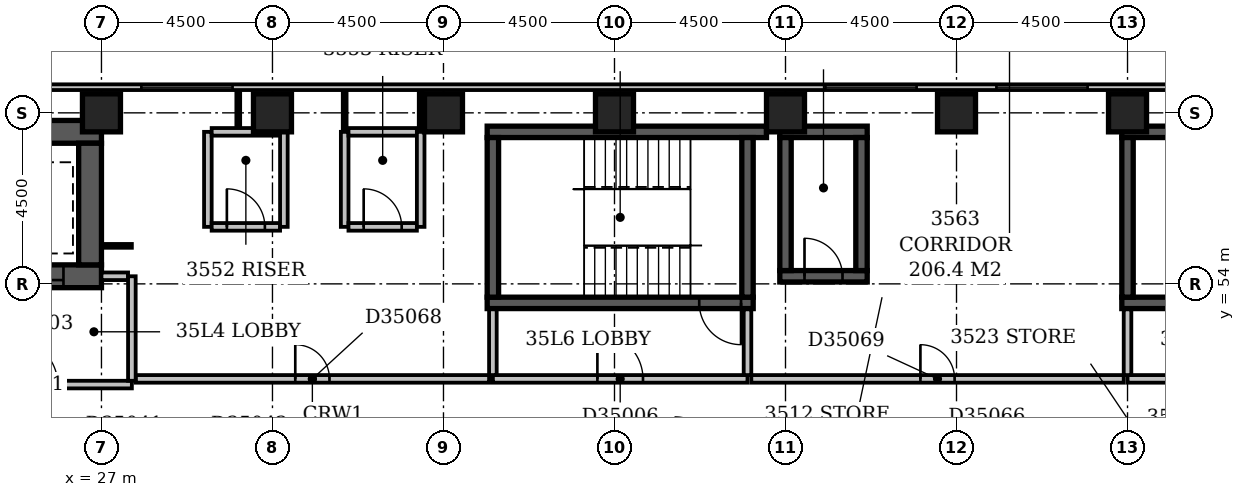
"""IFC4 building model, lengths in metres.
Left out: names, types, materials, properties, quantities, classifications, styles, units other than length and angle.
Written with IfcOpenShell. Run it as: python <this file> out.ifc"""

import sys

from ifc_helpers import new_model, si_unit, direction, frame, frame_2d, origin, origin_2d, place, context, subcontext, project, spatial, rectangle, extrude, element, fill, save


model = new_model("IFC4")
c1 = context("Model", 3, precision=1e-05, world=origin(), true_north=direction((0.0, 1.0)))
c2 = subcontext(c1, "Body", "Model", "MODEL_VIEW")
j1 = project(units=[si_unit("LENGTHUNIT", "METRE"), si_unit("PLANEANGLEUNIT", "RADIAN")], contexts=[c1])
p1 = place(None, origin())
s1 = spatial("IfcSite", under=j1, at=p1, CompositionType="ELEMENT")
p2 = place(p1, origin())
s2 = spatial("IfcBuilding", under=s1, at=p2, CompositionType="ELEMENT")
p3 = place(p2, frame((0.0, 0.0, 141.2)))
s3 = spatial("IfcBuildingStorey", under=s2, at=p3, CompositionType="ELEMENT", Elevation=141.2)
p4 = place(p3, frame((23.9, 54.2, -0.3), z_axis=(0.0, 0.0, 1.0), x_axis=(1.0, 0.0, 0.0)))
e1 = element("IfcWall", 1, at=p4, inside=s3, PredefinedType="SHEAR", context=c2, shape_type="SweptSolid", body=[
    extrude(rectangle(XDim=3.1, YDim=0.6, at=frame_2d((1.55, 0.0))), origin(), (0.0, 0.0, 1.0), 3.6),
])
p5 = place(p4, frame((1.0, 0.0, 0.3)))
e2 = element("IfcOpeningElement", 2, at=p5, cuts=e1, PredefinedType="OPENING", context=c2, shape_type="SweptSolid", body=[
    extrude(rectangle(XDim=1.1, YDim=2.1, at=frame_2d((0.55, 1.05))), frame((0.0, 0.312, 0.0), z_axis=(0.0, -1.0, 0.0), x_axis=(1.0, 0.0, 0.0)), (0.0, 0.0, 1.0), 0.624),
])
p6 = place(p3, frame((23.9, 58.0, -0.3), z_axis=(0.0, 0.0, 1.0), x_axis=(1.0, 0.0, 0.0)))
e3 = element("IfcWall", 3, at=p6, inside=s3, PredefinedType="SHEAR", context=c2, shape_type="SweptSolid", body=[
    extrude(rectangle(XDim=3.1, YDim=0.6, at=frame_2d((1.55, 0.0))), origin(), (0.0, 0.0, 1.0), 3.6),
])
p7 = place(p3, frame((26.7, 54.5, -0.3), z_axis=(0.0, 0.0, 1.0), x_axis=(0.0, 1.0, 0.0)))
e4 = element("IfcWall", 4, at=p7, inside=s3, PredefinedType="SHEAR", context=c2, shape_type="SweptSolid", body=[
    extrude(rectangle(XDim=3.2, YDim=0.6, at=frame_2d((1.6, 0.0))), origin(), (0.0, 0.0, 1.0), 3.6),
])
p8 = place(p3, frame((37.15, 53.5, -0.3), z_axis=(0.0, 0.0, 1.0), x_axis=(1.0, 0.0, 0.0)))
e5 = element("IfcWall", 5, at=p8, inside=s3, PredefinedType="SHEAR", context=c2, shape_type="SweptSolid", body=[
    extrude(rectangle(XDim=7.0, YDim=0.3, at=frame_2d((3.5, 0.0))), origin(), (0.0, 0.0, 1.0), 3.6),
])
p9 = place(p8, frame((5.58, 0.0, 0.3)))
e6 = element("IfcOpeningElement", 6, at=p9, cuts=e5, PredefinedType="OPENING", context=c2, shape_type="SweptSolid", body=[
    extrude(rectangle(XDim=1.1, YDim=2.1, at=frame_2d((0.55, 1.05))), frame((0.0, 0.162, 0.0), z_axis=(0.0, -1.0, 0.0), x_axis=(1.0, 0.0, 0.0)), (0.0, 0.0, 1.0), 0.324),
])
p10 = place(p3, frame((37.15, 58.0, -0.3), z_axis=(0.0, 0.0, 1.0), x_axis=(1.0, 0.0, 0.0)))
e7 = element("IfcWall", 7, at=p10, inside=s3, PredefinedType="SHEAR", context=c2, shape_type="SweptSolid", body=[
    extrude(rectangle(XDim=7.35, YDim=0.3, at=frame_2d((3.675, 0.0))), origin(), (0.0, 0.0, 1.0), 3.6),
])
for number, where, z_axis, x_axis in (
    (8, (37.3, 53.65, -0.3), (0.0, 0.0, 1.0), (0.0, 1.0, 0.0)),
    (9, (44.0, 53.65, -0.3), (0.0, 0.0, 1.0), (0.0, 1.0, 0.0)),
):
    element("IfcWall", number, at=place(p3, frame(where, z_axis=z_axis, x_axis=x_axis)), inside=s3, PredefinedType="SHEAR", context=c2, shape_type="SweptSolid", body=[
        extrude(rectangle(XDim=4.2, YDim=0.3, at=frame_2d((2.1, 0.0))), origin(), (0.0, 0.0, 1.0), 3.6),
    ])
p11 = place(p3, frame((44.85, 54.2, -0.3), z_axis=(0.0, 0.0, 1.0), x_axis=(1.0, 0.0, 0.0)))
e10 = element("IfcWall", 10, at=p11, inside=s3, PredefinedType="SHEAR", context=c2, shape_type="SweptSolid", body=[
    extrude(rectangle(XDim=2.3, YDim=0.3, at=frame_2d((1.15, 0.0))), origin(), (0.0, 0.0, 1.0), 3.6),
])
p12 = place(p11, frame((0.65, 0.0, 0.3)))
e11 = element("IfcOpeningElement", 11, at=p12, cuts=e10, PredefinedType="OPENING", context=c2, shape_type="SweptSolid", body=[
    extrude(rectangle(XDim=1.0, YDim=2.1, at=frame_2d((0.5, 1.05))), frame((0.0, 0.162, 0.0), z_axis=(0.0, -1.0, 0.0), x_axis=(1.0, 0.0, 0.0)), (0.0, 0.0, 1.0), 0.324),
])
p13 = place(p3, frame((44.85, 58.0, -0.3), z_axis=(0.0, 0.0, 1.0), x_axis=(1.0, 0.0, 0.0)))
e12 = element("IfcWall", 12, at=p13, inside=s3, PredefinedType="SHEAR", context=c2, shape_type="SweptSolid", body=[
    extrude(rectangle(XDim=2.3, YDim=0.3, at=frame_2d((1.15, 0.0))), origin(), (0.0, 0.0, 1.0), 3.6),
])
for number, where, z_axis, x_axis in (
    (13, (45.0, 54.35, -0.3), (0.0, 0.0, 1.0), (0.0, 1.0, 0.0)),
    (14, (47.0, 54.35, -0.3), (0.0, 0.0, 1.0), (0.0, 1.0, 0.0)),
):
    element("IfcWall", number, at=place(p3, frame(where, z_axis=z_axis, x_axis=x_axis)), inside=s3, PredefinedType="SHEAR", context=c2, shape_type="SweptSolid", body=[
        extrude(rectangle(XDim=3.5, YDim=0.3, at=frame_2d((1.75, 0.0))), origin(), (0.0, 0.0, 1.0), 3.6),
    ])
p14 = place(p3, frame((53.85, 53.5, -0.3), z_axis=(0.0, 0.0, 1.0), x_axis=(1.0, 0.0, 0.0)))
e15 = element("IfcWall", 15, at=p14, inside=s3, PredefinedType="SHEAR", context=c2, shape_type="SweptSolid", body=[
    extrude(rectangle(XDim=7.0, YDim=0.3, at=frame_2d((3.5, 0.0))), origin(), (0.0, 0.0, 1.0), 3.6),
])
p15 = place(p14, frame((5.58, 0.0, 0.3)))
e16 = element("IfcOpeningElement", 16, at=p15, cuts=e15, PredefinedType="OPENING", context=c2, shape_type="SweptSolid", body=[
    extrude(rectangle(XDim=1.1, YDim=2.1, at=frame_2d((0.55, 1.05))), frame((0.0, 0.162, 0.0), z_axis=(0.0, -1.0, 0.0), x_axis=(1.0, 0.0, 0.0)), (0.0, 0.0, 1.0), 0.324),
])
p16 = place(p3, frame((53.85, 58.0, -0.3), z_axis=(0.0, 0.0, 1.0), x_axis=(1.0, 0.0, 0.0)))
e17 = element("IfcWall", 17, at=p16, inside=s3, PredefinedType="SHEAR", context=c2, shape_type="SweptSolid", body=[
    extrude(rectangle(XDim=7.0, YDim=0.3, at=frame_2d((3.5, 0.0))), origin(), (0.0, 0.0, 1.0), 3.6),
])
p17 = place(p3, frame((54.0, 53.65, -0.3), z_axis=(0.0, 0.0, 1.0), x_axis=(0.0, 1.0, 0.0)))
e18 = element("IfcWall", 18, at=p17, inside=s3, PredefinedType="SHEAR", context=c2, shape_type="SweptSolid", body=[
    extrude(rectangle(XDim=4.2, YDim=0.3, at=frame_2d((2.1, 0.0))), origin(), (0.0, 0.0, 1.0), 3.6),
])
for number, where, z_axis, x_axis in (
    (19, (27.0, 58.5, -0.3), (0.0, 0.0, 1.0), (1.0, 0.0, 0.0)),
    (20, (31.5, 58.5, -0.3), (0.0, 0.0, 1.0), (1.0, 0.0, 0.0)),
    (21, (36.0, 58.5, -0.3), (0.0, 0.0, 1.0), (1.0, 0.0, 0.0)),
    (22, (40.5, 58.5, -0.3), (0.0, 0.0, 1.0), (1.0, 0.0, 0.0)),
    (23, (45.0, 58.5, -0.3), (0.0, 0.0, 1.0), (1.0, 0.0, 0.0)),
    (24, (49.5, 58.5, -0.3), (0.0, 0.0, 1.0), (1.0, 0.0, 0.0)),
    (25, (54.0, 58.5, -0.3), (0.0, 0.0, 1.0), (1.0, 0.0, 0.0)),
):
    element("IfcColumn", number, at=place(p3, frame(where, z_axis=z_axis, x_axis=x_axis)), inside=s3, PredefinedType="COLUMN", context=c2, shape_type="SweptSolid", body=[
        extrude(rectangle(XDim=1.0, YDim=1.0, at=origin_2d()), origin(), (0.0, 0.0, 1.0), 3.6),
    ])
p18 = place(p3, frame((68.1, 59.175, 0.0), z_axis=(0.0, 0.0, 1.0), x_axis=(-1.0, 0.0, 0.0)))
e26 = element("IfcWall", 26, at=p18, inside=s3, PredefinedType="STANDARD", context=c2, shape_type="SweptSolid", body=[
    extrude(rectangle(XDim=68.85, YDim=0.15, at=frame_2d((34.425, 0.0))), origin(), (0.0, 0.0, 1.0), 2.7),
])
p19 = place(p18, frame((15.15, 0.0, 0.6)))
e27 = element("IfcOpeningElement", 27, at=p19, cuts=e26, PredefinedType="OPENING", context=c2, shape_type="SweptSolid", body=[
    extrude(rectangle(XDim=2.4, YDim=1.8, at=frame_2d((1.2, 0.9))), frame((0.0, 0.087, 0.0), z_axis=(0.0, -1.0, 0.0), x_axis=(1.0, 0.0, 0.0)), (0.0, 0.0, 1.0), 0.174),
])
p20 = place(p18, frame((19.65, 0.0, 0.6)))
e28 = element("IfcOpeningElement", 28, at=p20, cuts=e26, PredefinedType="OPENING", context=c2, shape_type="SweptSolid", body=[
    extrude(rectangle(XDim=2.4, YDim=1.8, at=frame_2d((1.2, 0.9))), frame((0.0, 0.087, 0.0), z_axis=(0.0, -1.0, 0.0), x_axis=(1.0, 0.0, 0.0)), (0.0, 0.0, 1.0), 0.174),
])
p21 = place(p18, frame((37.65, 0.0, 0.6)))
e29 = element("IfcOpeningElement", 29, at=p21, cuts=e26, PredefinedType="OPENING", context=c2, shape_type="SweptSolid", body=[
    extrude(rectangle(XDim=2.4, YDim=1.8, at=frame_2d((1.2, 0.9))), frame((0.0, 0.087, 0.0), z_axis=(0.0, -1.0, 0.0), x_axis=(1.0, 0.0, 0.0)), (0.0, 0.0, 1.0), 0.174),
])
p22 = place(p3, frame((23.0, 51.35, 0.0), z_axis=(0.0, 0.0, 1.0), x_axis=(1.0, 0.0, 0.0)))
e30 = element("IfcWall", 30, at=p22, inside=s3, PredefinedType="PARTITIONING", context=c2, shape_type="SweptSolid", body=[
    extrude(rectangle(XDim=4.8, YDim=0.2, at=frame_2d((2.4, 0.0))), origin(), (0.0, 0.0, 1.0), 3.3),
])
p23 = place(p22, frame((1.65, 0.0, 0.0)))
e31 = element("IfcOpeningElement", 31, at=p23, cuts=e30, PredefinedType="OPENING", context=c2, shape_type="SweptSolid", body=[
    extrude(rectangle(XDim=1.2, YDim=2.1, at=frame_2d((0.6, 1.05))), frame((0.0, 0.112, 0.0), z_axis=(0.0, -1.0, 0.0), x_axis=(1.0, 0.0, 0.0)), (0.0, 0.0, 1.0), 0.224),
])
p24 = place(p3, frame((27.8, 51.45, 0.0), z_axis=(0.0, 0.0, 1.0), x_axis=(0.0, 1.0, 0.0)))
e32 = element("IfcWall", 32, at=p24, inside=s3, PredefinedType="PARTITIONING", context=c2, shape_type="SweptSolid", body=[
    extrude(rectangle(XDim=2.75, YDim=0.2, at=frame_2d((1.375, 0.0))), origin(), (0.0, 0.0, 1.0), 3.3),
])
p25 = place(p3, frame((27.0, 54.2, 0.0), z_axis=(0.0, 0.0, 1.0), x_axis=(1.0, 0.0, 0.0)))
e33 = element("IfcWall", 33, at=p25, inside=s3, PredefinedType="PARTITIONING", context=c2, shape_type="SweptSolid", body=[
    extrude(rectangle(XDim=0.7, YDim=0.2, at=frame_2d((0.35, 0.0))), origin(), (0.0, 0.0, 1.0), 3.3),
])
p26 = place(p3, frame((37.3, 51.5, 0.0), z_axis=(0.0, 0.0, 1.0), x_axis=(1.0, 0.0, 0.0)))
e34 = element("IfcWall", 34, at=p26, inside=s3, PredefinedType="PARTITIONING", context=c2, shape_type="SweptSolid", body=[
    extrude(rectangle(XDim=6.7, YDim=0.2, at=frame_2d((3.35, 0.0))), origin(), (0.0, 0.0, 1.0), 3.3),
])
p27 = place(p26, frame((2.75, 0.0, 0.0)))
e35 = element("IfcOpeningElement", 35, at=p27, cuts=e34, PredefinedType="OPENING", context=c2, shape_type="SweptSolid", body=[
    extrude(rectangle(XDim=1.2, YDim=2.1, at=frame_2d((0.6, 1.05))), frame((0.0, 0.112, 0.0), z_axis=(0.0, -1.0, 0.0), x_axis=(1.0, 0.0, 0.0)), (0.0, 0.0, 1.0), 0.224),
])
for number, where, z_axis, x_axis in (
    (36, (44.0, 51.6, 0.0), (0.0, 0.0, 1.0), (0.0, 1.0, 0.0)),
    (37, (37.3, 51.6, 0.0), (0.0, 0.0, 1.0), (0.0, 1.0, 0.0)),
):
    element("IfcWall", number, at=place(p3, frame(where, z_axis=z_axis, x_axis=x_axis)), inside=s3, PredefinedType="PARTITIONING", context=c2, shape_type="SweptSolid", body=[
        extrude(rectangle(XDim=1.73, YDim=0.2, at=frame_2d((0.865, 0.0))), origin(), (0.0, 0.0, 1.0), 3.3),
    ])
p28 = place(p3, frame((54.0, 51.5, 0.0), z_axis=(0.0, 0.0, 1.0), x_axis=(1.0, 0.0, 0.0)))
e38 = element("IfcWall", 38, at=p28, inside=s3, PredefinedType="PARTITIONING", context=c2, shape_type="SweptSolid", body=[
    extrude(rectangle(XDim=6.7, YDim=0.2, at=frame_2d((3.35, 0.0))), origin(), (0.0, 0.0, 1.0), 3.3),
])
p29 = place(p28, frame((2.75, 0.0, 0.0)))
e39 = element("IfcOpeningElement", 39, at=p29, cuts=e38, PredefinedType="OPENING", context=c2, shape_type="SweptSolid", body=[
    extrude(rectangle(XDim=1.2, YDim=2.1, at=frame_2d((0.6, 1.05))), frame((0.0, 0.112, 0.0), z_axis=(0.0, -1.0, 0.0), x_axis=(1.0, 0.0, 0.0)), (0.0, 0.0, 1.0), 0.224),
])
p30 = place(p3, frame((54.0, 51.6, 0.0), z_axis=(0.0, 0.0, 1.0), x_axis=(0.0, 1.0, 0.0)))
e40 = element("IfcWall", 40, at=p30, inside=s3, PredefinedType="PARTITIONING", context=c2, shape_type="SweptSolid", body=[
    extrude(rectangle(XDim=1.73, YDim=0.2, at=frame_2d((0.865, 0.0))), origin(), (0.0, 0.0, 1.0), 2.6),
])
p31 = place(p3, frame((27.9, 51.5, 0.0), z_axis=(0.0, 0.0, 1.0), x_axis=(1.0, 0.0, 0.0)))
e41 = element("IfcWall", 41, at=p31, inside=s3, PredefinedType="PARTITIONING", context=c2, shape_type="SweptSolid", body=[
    extrude(rectangle(XDim=9.3, YDim=0.2, at=frame_2d((4.65, 0.0))), origin(), (0.0, 0.0, 1.0), 3.3),
])
p32 = place(p31, frame((4.2, 0.0, 0.0)))
e42 = element("IfcOpeningElement", 42, at=p32, cuts=e41, PredefinedType="OPENING", context=c2, shape_type="SweptSolid", body=[
    extrude(rectangle(XDim=0.9, YDim=2.1, at=frame_2d((0.45, 1.05))), frame((0.0, 0.112, 0.0), z_axis=(0.0, -1.0, 0.0), x_axis=(1.0, 0.0, 0.0)), (0.0, 0.0, 1.0), 0.224),
])
p33 = place(p3, frame((44.1, 51.5, 0.0), z_axis=(0.0, 0.0, 1.0), x_axis=(1.0, 0.0, 0.0)))
e43 = element("IfcWall", 43, at=p33, inside=s3, PredefinedType="PARTITIONING", context=c2, shape_type="SweptSolid", body=[
    extrude(rectangle(XDim=9.8, YDim=0.2, at=frame_2d((4.9, 0.0))), origin(), (0.0, 0.0, 1.0), 3.3),
])
p34 = place(p33, frame((4.45, 0.0, 0.0)))
e44 = element("IfcOpeningElement", 44, at=p34, cuts=e43, PredefinedType="OPENING", context=c2, shape_type="SweptSolid", body=[
    extrude(rectangle(XDim=0.9, YDim=2.1, at=frame_2d((0.45, 1.05))), frame((0.0, 0.112, 0.0), z_axis=(0.0, -1.0, 0.0), x_axis=(1.0, 0.0, 0.0)), (0.0, 0.0, 1.0), 0.224),
])
p35 = place(p3, frame((27.0, 55.0, 0.0), z_axis=(0.0, 0.0, 1.0), x_axis=(1.0, 0.0, 0.0)))
e45 = element("IfcWall", 45, at=p35, inside=s3, PredefinedType="PARTITIONING", context=c2, shape_type="SweptSolid", body=[
    extrude(rectangle(XDim=0.8, YDim=0.1, at=frame_2d((0.4, 0.0))), origin(), (0.0, 0.0, 1.0), 3.3),
])
p36 = place(p3, frame((29.8, 55.5, 0.0), z_axis=(0.0, 0.0, 1.0), x_axis=(0.0, 1.0, 0.0)))
e46 = element("IfcWall", 46, at=p36, inside=s3, PredefinedType="PARTITIONING", context=c2, shape_type="SweptSolid", body=[
    extrude(rectangle(XDim=2.5, YDim=0.2, at=frame_2d((1.25, 0.0))), origin(), (0.0, 0.0, 1.0), 3.3),
])
p37 = place(p3, frame((29.9, 55.5, 0.0), z_axis=(0.0, 0.0, 1.0), x_axis=(1.0, 0.0, 0.0)))
e47 = element("IfcWall", 47, at=p37, inside=s3, PredefinedType="PARTITIONING", context=c2, shape_type="SweptSolid", body=[
    extrude(rectangle(XDim=1.8, YDim=0.2, at=frame_2d((0.9, 0.0))), origin(), (0.0, 0.0, 1.0), 3.3),
])
p38 = place(p37, frame((0.4, 0.0, 0.0)))
e48 = element("IfcOpeningElement", 48, at=p38, cuts=e47, PredefinedType="OPENING", context=c2, shape_type="SweptSolid", body=[
    extrude(rectangle(XDim=1.0, YDim=2.1, at=frame_2d((0.5, 1.05))), frame((0.0, 0.112, 0.0), z_axis=(0.0, -1.0, 0.0), x_axis=(1.0, 0.0, 0.0)), (0.0, 0.0, 1.0), 0.224),
])
for number, where, z_axis, x_axis in (
    (49, (31.8, 55.5, 0.0), (0.0, 0.0, 1.0), (0.0, 1.0, 0.0)),
    (50, (33.4, 55.5, 0.0), (0.0, 0.0, 1.0), (0.0, 1.0, 0.0)),
):
    element("IfcWall", number, at=place(p3, frame(where, z_axis=z_axis, x_axis=x_axis)), inside=s3, PredefinedType="PARTITIONING", context=c2, shape_type="SweptSolid", body=[
        extrude(rectangle(XDim=2.5, YDim=0.2, at=frame_2d((1.25, 0.0))), origin(), (0.0, 0.0, 1.0), 3.3),
    ])
p39 = place(p3, frame((33.5, 55.5, 0.0), z_axis=(0.0, 0.0, 1.0), x_axis=(1.0, 0.0, 0.0)))
e51 = element("IfcWall", 51, at=p39, inside=s3, PredefinedType="PARTITIONING", context=c2, shape_type="SweptSolid", body=[
    extrude(rectangle(XDim=1.8, YDim=0.2, at=frame_2d((0.9, 0.0))), origin(), (0.0, 0.0, 1.0), 3.3),
])
p40 = place(p39, frame((0.4, 0.0, 0.0)))
e52 = element("IfcOpeningElement", 52, at=p40, cuts=e51, PredefinedType="OPENING", context=c2, shape_type="SweptSolid", body=[
    extrude(rectangle(XDim=1.0, YDim=2.1, at=frame_2d((0.5, 1.05))), frame((0.0, 0.112, 0.0), z_axis=(0.0, -1.0, 0.0), x_axis=(1.0, 0.0, 0.0)), (0.0, 0.0, 1.0), 0.224),
])
p41 = place(p3, frame((35.4, 55.5, 0.0), z_axis=(0.0, 0.0, 1.0), x_axis=(0.0, 1.0, 0.0)))
e53 = element("IfcWall", 53, at=p41, inside=s3, PredefinedType="PARTITIONING", context=c2, shape_type="SweptSolid", body=[
    extrude(rectangle(XDim=2.5, YDim=0.2, at=frame_2d((1.25, 0.0))), origin(), (0.0, 0.0, 1.0), 2.4),
])
p42 = place(p3, frame((29.9, 58.0, 0.0), z_axis=(0.0, 0.0, 1.0), x_axis=(1.0, 0.0, 0.0)))
e54 = element("IfcWall", 54, at=p42, inside=s3, PredefinedType="PARTITIONING", context=c2, shape_type="SweptSolid", body=[
    extrude(rectangle(XDim=1.8, YDim=0.2, at=frame_2d((0.9, 0.0))), origin(), (0.0, 0.0, 1.0), 3.3),
])
p43 = place(p3, frame((33.4, 58.0, 0.0), z_axis=(0.0, 0.0, 1.0), x_axis=(0.0, 1.0, 0.0)))
e55 = element("IfcWall", 55, at=p43, inside=s3, PredefinedType="PARTITIONING", context=c2, shape_type="SweptSolid", body=[
    extrude(rectangle(XDim=1.1, YDim=0.1, at=frame_2d((0.55, 0.0))), origin(), (0.0, 0.0, 1.0), 3.3),
])
p44 = place(p3, frame((33.5, 58.0, 0.0), z_axis=(0.0, 0.0, 1.0), x_axis=(1.0, 0.0, 0.0)))
e56 = element("IfcWall", 56, at=p44, inside=s3, PredefinedType="PARTITIONING", context=c2, shape_type="SweptSolid", body=[
    extrude(rectangle(XDim=1.8, YDim=0.2, at=frame_2d((0.9, 0.0))), origin(), (0.0, 0.0, 1.0), 3.3),
])
p45 = place(p3, frame((35.4, 58.0, 0.0), z_axis=(0.0, 0.0, 1.0), x_axis=(0.0, 1.0, 0.0)))
e57 = element("IfcWall", 57, at=p45, inside=s3, PredefinedType="PARTITIONING", context=c2, shape_type="SweptSolid", body=[
    extrude(rectangle(XDim=1.1, YDim=0.1, at=frame_2d((0.55, 0.0))), origin(), (0.0, 0.0, 1.0), 2.4),
])
p46 = place(p3, frame((30.6, 58.1, 0.0), z_axis=(0.0, 0.0, 1.0), x_axis=(0.0, 1.0, 0.0)))
e58 = element("IfcWall", 58, at=p46, inside=s3, PredefinedType="PARTITIONING", context=c2, shape_type="SweptSolid", body=[
    extrude(rectangle(XDim=1.0, YDim=0.1, at=frame_2d((0.5, 0.0))), origin(), (0.0, 0.0, 1.0), 3.3),
])
p47 = place(p19, origin())
e59 = element("IfcWindow", 59, at=p47, inside=s3, PartitioningType="SINGLE_PANEL", PredefinedType="WINDOW", context=c2, shape_type="SweptSolid", body=[
    extrude(rectangle(XDim=2.4, YDim=1.8, at=frame_2d((1.2, 0.9))), frame((0.0, 0.03, 0.0), z_axis=(0.0, -1.0, 0.0), x_axis=(1.0, 0.0, 0.0)), (0.0, 0.0, 1.0), 0.06),
])
fill(e27, e59)
p48 = place(p20, origin())
e60 = element("IfcWindow", 60, at=p48, inside=s3, PartitioningType="SINGLE_PANEL", PredefinedType="WINDOW", context=c2, shape_type="SweptSolid", body=[
    extrude(rectangle(XDim=2.4, YDim=1.8, at=frame_2d((1.2, 0.9))), frame((0.0, 0.03, 0.0), z_axis=(0.0, -1.0, 0.0), x_axis=(1.0, 0.0, 0.0)), (0.0, 0.0, 1.0), 0.06),
])
fill(e28, e60)
p49 = place(p21, origin())
e61 = element("IfcWindow", 61, at=p49, inside=s3, PartitioningType="SINGLE_PANEL", PredefinedType="WINDOW", context=c2, shape_type="SweptSolid", body=[
    extrude(rectangle(XDim=2.4, YDim=1.8, at=frame_2d((1.2, 0.9))), frame((0.0, 0.03, 0.0), z_axis=(0.0, -1.0, 0.0), x_axis=(1.0, 0.0, 0.0)), (0.0, 0.0, 1.0), 0.06),
])
fill(e29, e61)
p50 = place(p23, origin())
e62 = element("IfcDoor", 62, at=p50, inside=s3, OperationType="SINGLE_SWING_LEFT", PredefinedType="DOOR", context=c2, shape_type="SweptSolid", body=[
    extrude(rectangle(XDim=1.2, YDim=2.1, at=frame_2d((0.6, 1.05))), frame((0.0, 0.025, 0.0), z_axis=(0.0, -1.0, 0.0), x_axis=(1.0, 0.0, 0.0)), (0.0, 0.0, 1.0), 0.05),
])
fill(e31, e62)
p51 = place(p5, origin())
e63 = element("IfcDoor", 63, at=p51, inside=s3, OperationType="SLIDING_TO_LEFT", PredefinedType="DOOR", context=c2, shape_type="SweptSolid", body=[
    extrude(rectangle(XDim=1.1, YDim=2.1, at=frame_2d((0.55, 1.05))), frame((0.0, 0.025, 0.0), z_axis=(0.0, -1.0, 0.0), x_axis=(1.0, 0.0, 0.0)), (0.0, 0.0, 1.0), 0.05),
])
fill(e2, e63)
p52 = place(p27, origin())
e64 = element("IfcDoor", 64, at=p52, inside=s3, OperationType="SINGLE_SWING_LEFT", PredefinedType="DOOR", context=c2, shape_type="SweptSolid", body=[
    extrude(rectangle(XDim=1.2, YDim=2.1, at=frame_2d((0.6, 1.05))), frame((0.0, 0.025, 0.0), z_axis=(0.0, -1.0, 0.0), x_axis=(1.0, 0.0, 0.0)), (0.0, 0.0, 1.0), 0.05),
])
fill(e35, e64)
p53 = place(p12, origin())
e65 = element("IfcDoor", 65, at=p53, inside=s3, OperationType="SINGLE_SWING_LEFT", PredefinedType="DOOR", context=c2, shape_type="SweptSolid", body=[
    extrude(rectangle(XDim=1.0, YDim=2.1, at=frame_2d((0.5, 1.05))), frame((0.0, 0.025, 0.0), z_axis=(0.0, -1.0, 0.0), x_axis=(1.0, 0.0, 0.0)), (0.0, 0.0, 1.0), 0.05),
])
fill(e11, e65)
p54 = place(p9, origin())
e66 = element("IfcDoor", 66, at=p54, inside=s3, OperationType="SINGLE_SWING_RIGHT", PredefinedType="DOOR", context=c2, shape_type="SweptSolid", body=[
    extrude(rectangle(XDim=1.1, YDim=2.1, at=frame_2d((0.55, 1.05))), frame((0.0, 0.025, 0.0), z_axis=(0.0, -1.0, 0.0), x_axis=(1.0, 0.0, 0.0)), (0.0, 0.0, 1.0), 0.05),
])
fill(e6, e66)
p55 = place(p32, origin())
e67 = element("IfcDoor", 67, at=p55, inside=s3, OperationType="SINGLE_SWING_LEFT", PredefinedType="DOOR", context=c2, shape_type="SweptSolid", body=[
    extrude(rectangle(XDim=0.9, YDim=2.1, at=frame_2d((0.45, 1.05))), frame((0.0, 0.025, 0.0), z_axis=(0.0, -1.0, 0.0), x_axis=(1.0, 0.0, 0.0)), (0.0, 0.0, 1.0), 0.05),
])
fill(e42, e67)
p56 = place(p34, origin())
e68 = element("IfcDoor", 68, at=p56, inside=s3, OperationType="SINGLE_SWING_LEFT", PredefinedType="DOOR", context=c2, shape_type="SweptSolid", body=[
    extrude(rectangle(XDim=0.9, YDim=2.1, at=frame_2d((0.45, 1.05))), frame((0.0, 0.025, 0.0), z_axis=(0.0, -1.0, 0.0), x_axis=(1.0, 0.0, 0.0)), (0.0, 0.0, 1.0), 0.05),
])
fill(e44, e68)
p57 = place(p38, origin())
e69 = element("IfcDoor", 69, at=p57, inside=s3, OperationType="SINGLE_SWING_LEFT", PredefinedType="DOOR", context=c2, shape_type="SweptSolid", body=[
    extrude(rectangle(XDim=1.0, YDim=2.1, at=frame_2d((0.5, 1.05))), frame((0.0, 0.025, 0.0), z_axis=(0.0, -1.0, 0.0), x_axis=(1.0, 0.0, 0.0)), (0.0, 0.0, 1.0), 0.05),
])
fill(e48, e69)
p58 = place(p40, origin())
e70 = element("IfcDoor", 70, at=p58, inside=s3, OperationType="SINGLE_SWING_LEFT", PredefinedType="DOOR", context=c2, shape_type="SweptSolid", body=[
    extrude(rectangle(XDim=1.0, YDim=2.1, at=frame_2d((0.5, 1.05))), frame((0.0, 0.025, 0.0), z_axis=(0.0, -1.0, 0.0), x_axis=(1.0, 0.0, 0.0)), (0.0, 0.0, 1.0), 0.05),
])
fill(e52, e70)
save(model, sys.argv[1])
